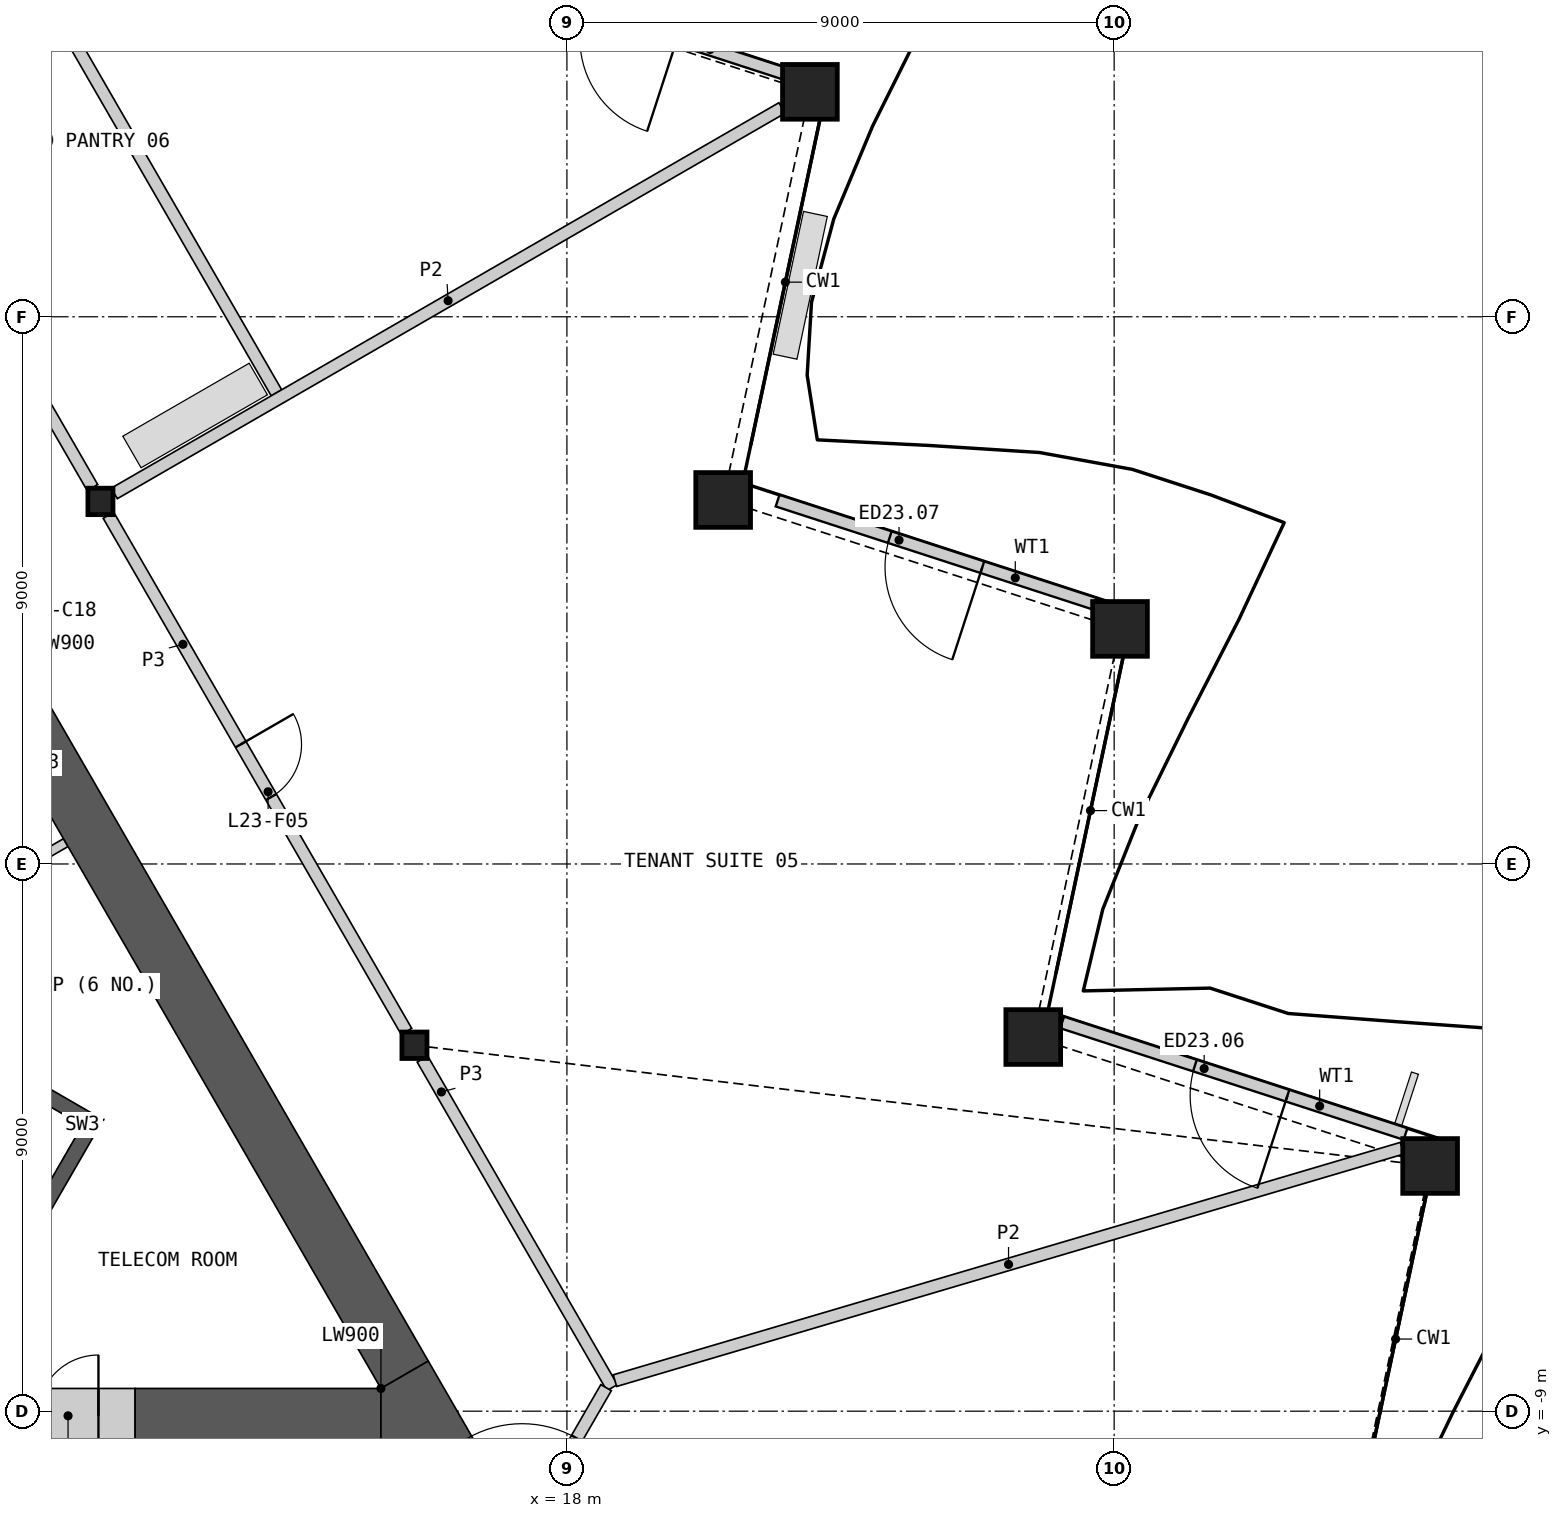
"""IFC4 building model, lengths in metres.
Left out: names, types, materials, properties, quantities, classifications, styles, units other than length and angle.
Written with IfcOpenShell. Run it as: python <this file> out.ifc"""

import sys

from ifc_helpers import new_model, si_unit, direction, frame, frame_2d, origin, origin_2d, place, context, subcontext, project, spatial, polyline, rectangle, hollow_rectangle, i_section, outline, extrude, element, fill, save


model = new_model("IFC4")
c1 = context("Model", 3, precision=1e-05, world=origin(), true_north=direction((0.0, 1.0)))
c2 = subcontext(c1, "Body", "Model", "MODEL_VIEW")
j1 = project(units=[si_unit("LENGTHUNIT", "METRE"), si_unit("PLANEANGLEUNIT", "RADIAN")], contexts=[c1])
p1 = place(None, origin())
s1 = spatial("IfcSite", under=j1, at=p1, CompositionType="ELEMENT")
p2 = place(p1, origin())
s2 = spatial("IfcBuilding", under=s1, at=p2, CompositionType="ELEMENT")
p3 = place(p2, frame((0.0, 0.0, 112.2)))
s3 = spatial("IfcBuildingStorey", under=s2, at=p3, CompositionType="ELEMENT", Elevation=112.2)
for number, where, z_axis, x_axis in (
    (1, (32.196, -4.967, 0.0), (0.0, 0.0, 1.0), (1.0, 0.0, 0.0)),
    (2, (25.669, -2.846, 0.0), (0.0, 0.0, 1.0), (1.0, 0.0, 0.0)),
    (3, (27.096, 3.866, 0.0), (0.0, 0.0, 1.0), (1.0, 0.0, 0.0)),
    (4, (20.57, 5.987, 0.0), (0.0, 0.0, 1.0), (1.0, 0.0, 0.0)),
    (5, (21.996, 12.699, 0.0), (0.0, 0.0, 1.0), (1.0, 0.0, 0.0)),
):
    element("IfcColumn", number, at=place(p3, frame(where, z_axis=z_axis, x_axis=x_axis)), inside=s3, PredefinedType="COLUMN", context=c2, shape_type="SweptSolid", body=[
        extrude(hollow_rectangle(XDim=0.9, YDim=0.9, WallThickness=0.06, at=origin_2d()), origin(), (0.0, 0.0, 1.0), 4.2),
    ])
for number, where, z_axis, x_axis in (
    (6, (15.493, -2.982, 0.0), (0.0, 0.0, 1.0), (1.0, 0.0, 0.0)),
    (7, (10.328, 5.963, 0.0), (0.0, 0.0, 1.0), (1.0, 0.0, 0.0)),
):
    element("IfcColumn", number, at=place(p3, frame(where, z_axis=z_axis, x_axis=x_axis)), inside=s3, PredefinedType="COLUMN", context=c2, shape_type="SweptSolid", body=[
        extrude(i_section(OverallWidth=0.412, OverallDepth=0.435, WebThickness=0.036, FlangeThickness=0.057, at=origin_2d()), origin(), (0.0, 0.0, 1.0), 4.2),
    ])
p4 = place(p3, frame((31.792, -4.441, 0.0), z_axis=(0.0, 0.0, 1.0), x_axis=(-0.951057028782, 0.309015417099, 0.0)))
e8 = element("IfcWall", 8, at=p4, inside=s3, PredefinedType="SOLIDWALL", context=c2, shape_type="SweptSolid", body=[
    extrude(rectangle(XDim=5.938, YDim=0.2, at=frame_2d((2.969, 0.0))), origin(), (0.0, 0.0, 1.0), 3.189),
])
p5 = place(p4, frame((2.042, 0.0, 0.0)))
e9 = element("IfcOpeningElement", 9, at=p5, cuts=e8, PredefinedType="OPENING", context=c2, shape_type="SweptSolid", body=[
    extrude(rectangle(XDim=1.6, YDim=2.4, at=frame_2d((0.8, 1.2))), frame((0.0, 0.11, 0.0), z_axis=(0.0, -1.0, 0.0), x_axis=(1.0, 0.0, 0.0)), (0.0, 0.0, 1.0), 0.22),
])
p6 = place(p3, frame((26.677, 4.282, 0.0), z_axis=(0.0, 0.0, 1.0), x_axis=(-0.951052727247, 0.309028655624, 0.0)))
e10 = element("IfcWall", 10, at=p6, inside=s3, PredefinedType="SOLIDWALL", context=c2, shape_type="SweptSolid", body=[
    extrude(rectangle(XDim=5.48, YDim=0.2, at=frame_2d((2.74, 0.0))), origin(), (0.0, 0.0, 1.0), 3.189),
])
p7 = place(p6, frame((1.94, 0.0, 0.0)))
e11 = element("IfcOpeningElement", 11, at=p7, cuts=e10, PredefinedType="OPENING", context=c2, shape_type="SweptSolid", body=[
    extrude(rectangle(XDim=1.6, YDim=2.4, at=frame_2d((0.8, 1.2))), frame((0.0, 0.11, 0.0), z_axis=(0.0, -1.0, 0.0), x_axis=(1.0, 0.0, 0.0)), (0.0, 0.0, 1.0), 0.22),
])
p8 = place(p3, frame((21.659, 12.973, 0.0), z_axis=(0.0, 0.0, 1.0), x_axis=(-0.951065819309, 0.308988361175, 0.0)))
e12 = element("IfcWall", 12, at=p8, inside=s3, PredefinedType="SOLIDWALL", context=c2, shape_type="SweptSolid", body=[
    extrude(rectangle(XDim=5.48, YDim=0.2, at=frame_2d((2.74, 0.0))), origin(), (0.0, 0.0, 1.0), 3.189),
])
p9 = place(p8, frame((1.94, 0.0, 0.0)))
e13 = element("IfcOpeningElement", 13, at=p9, cuts=e12, PredefinedType="OPENING", context=c2, shape_type="SweptSolid", body=[
    extrude(rectangle(XDim=1.6, YDim=2.4, at=frame_2d((0.8, 1.2))), frame((0.0, 0.11, 0.0), z_axis=(0.0, -1.0, 0.0), x_axis=(1.0, 0.0, 0.0)), (0.0, 0.0, 1.0), 0.22),
])
p10 = place(p3, origin())
e14 = element("IfcWall", 14, at=p10, inside=s3, PredefinedType="SHEAR", context=c2, shape_type="SweptSolid", body=[
    extrude(outline(polyline([(8.83, -6.881), (10.374, -4.206), (10.032, -4.298), (8.738, -6.539), (8.83, -6.881)])), origin(), (0.0, 0.0, 1.0), 3.8),
])
p11 = place(p3, origin())
e15 = element("IfcWall", 15, at=p11, inside=s3, PredefinedType="SHEAR", context=c2, shape_type="SweptSolid", body=[
    extrude(outline(polyline([(10.032, -4.298), (10.374, -4.206), (5.307, -1.281), (5.182, -1.498), (10.032, -4.298)])), origin(), (0.0, 0.0, 1.0), 3.8),
])
p12 = place(p3, frame((8.268, -0.509, 0.0), z_axis=(0.0, 0.0, 1.0), x_axis=(0.866024871741, 0.500000921525, 0.0)))
e16 = element("IfcWall", 16, at=p12, inside=s3, PredefinedType="PARTITIONING", context=c2, shape_type="SweptSolid", body=[
    extrude(rectangle(XDim=1.72, YDim=0.15, at=frame_2d((0.86, 0.0))), origin(), (0.0, 0.0, 1.0), 3.8),
])
p13 = place(p3, frame((10.896, -9.076, 0.0), z_axis=(0.0, 0.0, 1.0), x_axis=(1.0, 0.0, 0.0)))
e17 = element("IfcWall", 17, at=p13, inside=s3, PredefinedType="SHEAR", context=c2, shape_type="SweptSolid", body=[
    extrude(rectangle(XDim=4.046, YDim=0.9, at=frame_2d((2.023, 0.0))), origin(), (0.0, 0.0, 1.0), 3.8),
])
p14 = place(p3, frame((15.331, -8.401, 0.0), z_axis=(0.0, 0.0, 1.0), x_axis=(-0.49999216708, 0.866029926076, 0.0)))
e18 = element("IfcWall", 18, at=p14, inside=s3, PredefinedType="SHEAR", context=c2, shape_type="SweptSolid", body=[
    extrude(rectangle(XDim=12.641, YDim=0.9, at=frame_2d((6.321, 0.0))), origin(), (0.0, 0.0, 1.0), 3.8),
])
p15 = place(p3, origin())
e19 = element("IfcWall", 19, at=p15, inside=s3, PredefinedType="SHEAR", context=c2, shape_type="SweptSolid", body=[
    extrude(outline(polyline([(14.941, -8.626), (15.721, -8.176), (16.5, -9.526), (14.941, -9.526), (14.941, -8.626)])), origin(), (0.0, 0.0, 1.0), 3.8),
])
p16 = place(p3, frame((8.696, -9.076, 0.0), z_axis=(0.0, 0.0, 1.0), x_axis=(1.0, 0.0, 0.0)))
e20 = element("IfcWall", 20, at=p16, inside=s3, PredefinedType="SHEAR", context=c2, shape_type="SweptSolid", body=[
    extrude(rectangle(XDim=2.2, YDim=0.9, at=frame_2d((1.1, 0.0))), origin(), (0.0, 0.0, 1.0), 3.8),
])
p17 = place(p16, frame((0.6, 0.0, 0.0)))
e21 = element("IfcOpeningElement", 21, at=p17, cuts=e20, PredefinedType="OPENING", context=c2, shape_type="SweptSolid", body=[
    extrude(rectangle(XDim=1.0, YDim=2.1, at=frame_2d((0.5, 1.05))), frame((0.0, 0.46, 0.0), z_axis=(0.0, -1.0, 0.0), x_axis=(1.0, 0.0, 0.0)), (0.0, 0.0, 1.0), 0.92),
])
p18 = place(p3, frame((10.46, 5.736, 0.0), z_axis=(0.0, 0.0, 1.0), x_axis=(0.500004141693, -0.866023012564, 0.0)))
e22 = element("IfcWall", 22, at=p18, inside=s3, PredefinedType="PARTITIONING", context=c2, shape_type="SweptSolid", body=[
    extrude(rectangle(XDim=9.803, YDim=0.2, at=frame_2d((4.902, 0.0))), origin(), (0.0, 0.0, 1.0), 3.8),
])
p19 = place(p18, frame((4.352, 0.0, 0.0)))
e23 = element("IfcOpeningElement", 23, at=p19, cuts=e22, PredefinedType="OPENING", context=c2, shape_type="SweptSolid", body=[
    extrude(rectangle(XDim=1.0, YDim=2.1, at=frame_2d((0.5, 1.05))), frame((0.0, 0.11, 0.0), z_axis=(0.0, -1.0, 0.0), x_axis=(1.0, 0.0, 0.0)), (0.0, 0.0, 1.0), 0.22),
])
p20 = place(p3, frame((5.295, 14.68, 0.0), z_axis=(0.0, 0.0, 1.0), x_axis=(0.500012035596, -0.866018454918, 0.0)))
e24 = element("IfcWall", 24, at=p20, inside=s3, PredefinedType="PARTITIONING", context=c2, shape_type="SweptSolid", body=[
    extrude(rectangle(XDim=9.803, YDim=0.2, at=frame_2d((4.902, 0.0))), origin(), (0.0, 0.0, 1.0), 3.8),
])
p21 = place(p20, frame((4.376, 0.0, 0.0)))
e25 = element("IfcOpeningElement", 25, at=p21, cuts=e24, PredefinedType="OPENING", context=c2, shape_type="SweptSolid", body=[
    extrude(rectangle(XDim=0.95, YDim=2.1, at=frame_2d((0.475, 1.05))), frame((0.0, 0.11, 0.0), z_axis=(0.0, -1.0, 0.0), x_axis=(1.0, 0.0, 0.0)), (0.0, 0.0, 1.0), 0.22),
])
p22 = place(p3, frame((15.624, -3.209, 0.0), z_axis=(0.0, 0.0, 1.0), x_axis=(0.499997920671, -0.866026604282, 0.0)))
e26 = element("IfcWall", 26, at=p22, inside=s3, PredefinedType="PARTITIONING", context=c2, shape_type="SweptSolid", body=[
    extrude(rectangle(XDim=6.24, YDim=0.2, at=frame_2d((3.12, 0.0))), origin(), (0.0, 0.0, 1.0), 3.8),
])
p23 = place(p3, frame((16.781, -11.84, 0.0), z_axis=(0.0, 0.0, 1.0), x_axis=(0.499958791762, 0.866049194065, 0.0)))
e27 = element("IfcWall", 27, at=p23, inside=s3, PredefinedType="PARTITIONING", context=c2, shape_type="SweptSolid", body=[
    extrude(rectangle(XDim=3.726, YDim=0.2, at=frame_2d((1.863, 0.0))), origin(), (0.0, 0.0, 1.0), 3.8),
])
p24 = place(p23, frame((0.963, 0.0, 0.0)))
e28 = element("IfcOpeningElement", 28, at=p24, cuts=e27, PredefinedType="OPENING", context=c2, shape_type="SweptSolid", body=[
    extrude(rectangle(XDim=1.8, YDim=2.1, at=frame_2d((0.9, 1.05))), frame((0.0, 0.11, 0.0), z_axis=(0.0, -1.0, 0.0), x_axis=(1.0, 0.0, 0.0)), (0.0, 0.0, 1.0), 0.22),
])
p25 = place(p3, frame((4.548, 22.775, 0.0), z_axis=(0.0, 0.0, 1.0), x_axis=(0.499999764473, -0.866025539766, 0.0)))
e29 = element("IfcWall", 29, at=p25, inside=s3, PredefinedType="PARTITIONING", context=c2, shape_type="SweptSolid", body=[
    extrude(rectangle(XDim=17.35, YDim=0.2, at=frame_2d((8.675, 0.0))), origin(), (0.0, 0.0, 1.0), 2.885),
])
p26 = place(p25, frame((7.65, 0.0, 0.0)))
e30 = element("IfcOpeningElement", 30, at=p26, cuts=e29, PredefinedType="OPENING", context=c2, shape_type="SweptSolid", body=[
    extrude(rectangle(XDim=0.95, YDim=2.1, at=frame_2d((0.475, 1.05))), frame((0.0, 0.11, 0.0), z_axis=(0.0, -1.0, 0.0), x_axis=(1.0, 0.0, 0.0)), (0.0, 0.0, 1.0), 0.22),
])
p27 = place(p3, frame((18.79, -8.498, 0.0), z_axis=(0.0, 0.0, 1.0), x_axis=(0.959053889024, 0.283223653581, 0.0)))
e31 = element("IfcWall", 31, at=p27, inside=s3, PredefinedType="PARTITIONING", context=c2, shape_type="SweptSolid", body=[
    extrude(rectangle(XDim=13.499, YDim=0.2, at=frame_2d((6.75, 0.0))), origin(), (0.0, 0.0, 1.0), 2.885),
])
p28 = place(p3, frame((10.556, 6.094, 0.0), z_axis=(0.0, 0.0, 1.0), x_axis=(0.86602461759, 0.500001361726, 0.0)))
e32 = element("IfcWall", 32, at=p28, inside=s3, PredefinedType="PARTITIONING", context=c2, shape_type="SweptSolid", body=[
    extrude(rectangle(XDim=12.679, YDim=0.2, at=frame_2d((6.34, 0.0))), origin(), (0.0, 0.0, 1.0), 2.885),
])
p29 = place(p5, origin())
e33 = element("IfcDoor", 33, at=p29, inside=s3, OperationType="DOUBLE_DOOR_SINGLE_SWING", PredefinedType="DOOR", context=c2, shape_type="SweptSolid", body=[
    extrude(rectangle(XDim=1.6, YDim=2.4, at=frame_2d((0.8, 1.2))), frame((0.0, 0.025, 0.0), z_axis=(0.0, -1.0, 0.0), x_axis=(1.0, 0.0, 0.0)), (0.0, 0.0, 1.0), 0.05),
])
fill(e9, e33)
p30 = place(p7, origin())
e34 = element("IfcDoor", 34, at=p30, inside=s3, OperationType="DOUBLE_DOOR_SINGLE_SWING", PredefinedType="DOOR", context=c2, shape_type="SweptSolid", body=[
    extrude(rectangle(XDim=1.6, YDim=2.4, at=frame_2d((0.8, 1.2))), frame((0.0, 0.025, 0.0), z_axis=(0.0, -1.0, 0.0), x_axis=(1.0, 0.0, 0.0)), (0.0, 0.0, 1.0), 0.05),
])
fill(e11, e34)
p31 = place(p17, origin())
e35 = element("IfcDoor", 35, at=p31, inside=s3, OperationType="SINGLE_SWING_RIGHT", PredefinedType="DOOR", context=c2, shape_type="SweptSolid", body=[
    extrude(rectangle(XDim=1.0, YDim=2.1, at=frame_2d((0.5, 1.05))), frame((0.0, 0.205, 0.0), z_axis=(0.0, -1.0, 0.0), x_axis=(1.0, 0.0, 0.0)), (0.0, 0.0, 1.0), 0.05),
])
fill(e21, e35)
p32 = place(p24, origin())
e36 = element("IfcDoor", 36, at=p32, inside=s3, OperationType="DOUBLE_DOOR_SINGLE_SWING", PredefinedType="DOOR", context=c2, shape_type="SweptSolid", body=[
    extrude(rectangle(XDim=1.8, YDim=2.1, at=frame_2d((0.9, 1.05))), frame((0.0, 0.025, 0.0), z_axis=(0.0, -1.0, 0.0), x_axis=(1.0, 0.0, 0.0)), (0.0, 0.0, 1.0), 0.05),
])
fill(e28, e36)
p33 = place(p19, origin())
e37 = element("IfcDoor", 37, at=p33, inside=s3, OperationType="SINGLE_SWING_LEFT", PredefinedType="DOOR", context=c2, shape_type="SweptSolid", body=[
    extrude(rectangle(XDim=1.0, YDim=2.1, at=frame_2d((0.5, 1.05))), frame((0.0, 0.025, 0.0), z_axis=(0.0, -1.0, 0.0), x_axis=(1.0, 0.0, 0.0)), (0.0, 0.0, 1.0), 0.05),
])
fill(e23, e37)
save(model, sys.argv[1])
